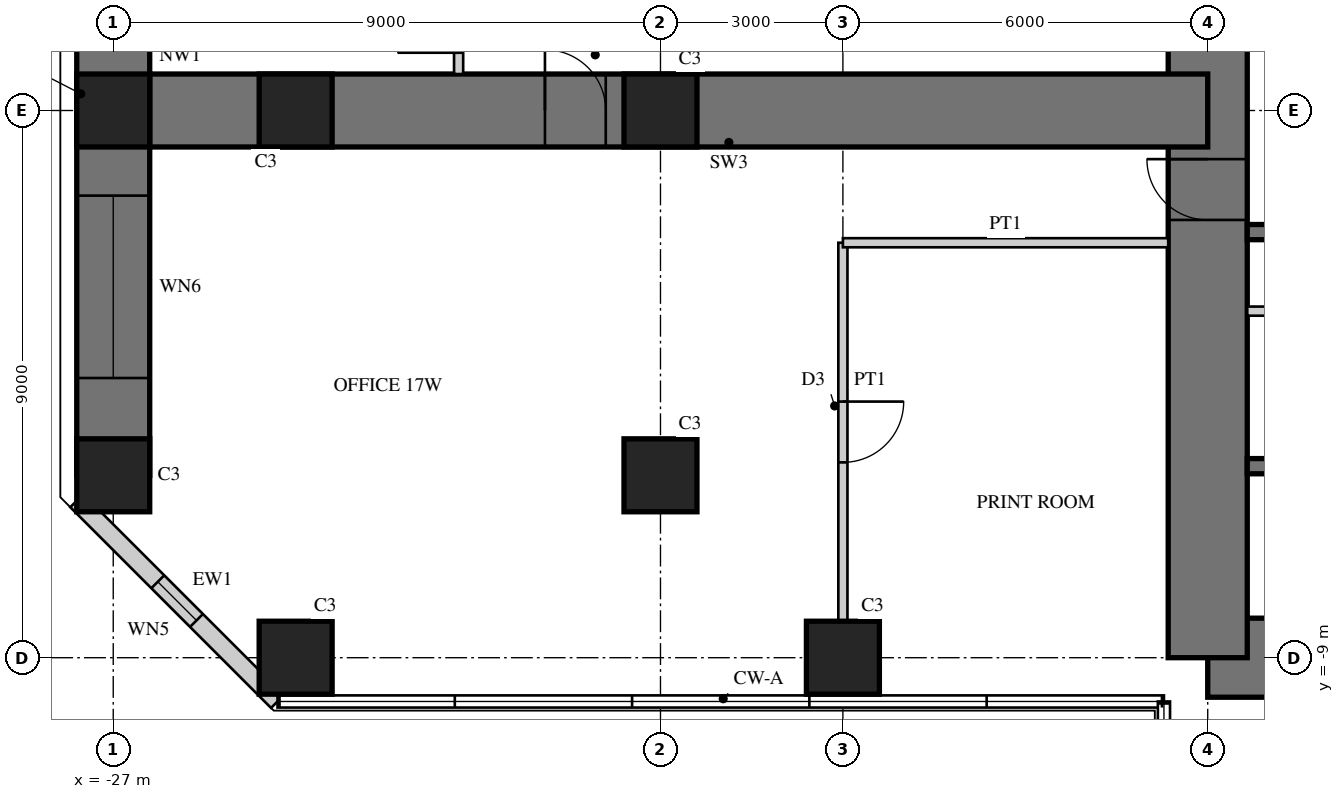
"""IFC4 building model, lengths in metres.
Left out: names, types, materials, properties, quantities, classifications, styles, units other than length and angle.
Written with IfcOpenShell. Run it as: python <this file> out.ifc"""

import sys

from ifc_helpers import new_model, si_unit, direction, frame, frame_2d, origin, origin_2d, place, context, subcontext, project, spatial, rectangle, hollow_rectangle, extrude, element, fill, save


model = new_model("IFC4")
c1 = context("Model", 3, precision=1e-05, world=origin(), true_north=direction((0.0, 1.0)))
c2 = subcontext(c1, "Body", "Model", "MODEL_VIEW")
j1 = project(units=[si_unit("LENGTHUNIT", "METRE"), si_unit("PLANEANGLEUNIT", "RADIAN")], contexts=[c1])
p1 = place(None, origin())
s1 = spatial("IfcSite", under=j1, at=p1, CompositionType="ELEMENT")
p2 = place(p1, origin())
s2 = spatial("IfcBuilding", under=s1, at=p2, CompositionType="ELEMENT")
p3 = place(p2, frame((0.0, 0.0, 71.5)))
s3 = spatial("IfcBuildingStorey", under=s2, at=p3, CompositionType="ELEMENT", Elevation=71.5)
p4 = place(p3, frame((-9.0, -9.0, 0.0), z_axis=(0.0, 0.0, 1.0), x_axis=(1.0, 0.0, 0.0)))
e1 = element("IfcWall", 1, at=p4, inside=s3, PredefinedType="SHEAR", context=c2, shape_type="SweptSolid", body=[
    extrude(rectangle(XDim=18.0, YDim=1.3, at=frame_2d((9.0, 0.0))), origin(), (0.0, 0.0, 1.0), 4.0),
])
p5 = place(p4, frame((9.8, 0.0, 0.0)))
e2 = element("IfcOpeningElement", 2, at=p5, cuts=e1, PredefinedType="OPENING", context=c2, shape_type="SweptSolid", body=[
    extrude(rectangle(XDim=1.0, YDim=2.4, at=frame_2d((0.5, 1.2))), frame((0.0, 0.66, 0.0), z_axis=(0.0, -1.0, 0.0), x_axis=(1.0, 0.0, 0.0)), (0.0, 0.0, 1.0), 1.32),
])
p6 = place(p3, frame((-9.0, 9.0, 0.0), z_axis=(0.0, 0.0, 1.0), x_axis=(0.0, -1.0, 0.0)))
e3 = element("IfcWall", 3, at=p6, inside=s3, PredefinedType="SHEAR", context=c2, shape_type="SweptSolid", body=[
    extrude(rectangle(XDim=18.0, YDim=1.3, at=frame_2d((9.0, 0.0))), origin(), (0.0, 0.0, 1.0), 4.0),
])
p7 = place(p6, frame((9.8, 0.0, 0.0)))
e4 = element("IfcOpeningElement", 4, at=p7, cuts=e3, PredefinedType="OPENING", context=c2, shape_type="SweptSolid", body=[
    extrude(rectangle(XDim=1.0, YDim=2.4, at=frame_2d((0.5, 1.2))), frame((0.0, 0.66, 0.0), z_axis=(0.0, -1.0, 0.0), x_axis=(1.0, 0.0, 0.0)), (0.0, 0.0, 1.0), 1.32),
])
for number, where, z_axis, x_axis in (
    (5, (-1.925, -2.0, 0.0), (0.0, 0.0, 1.0), (-1.0, 0.0, 0.0)),
    (6, (-1.925, -5.85, 0.0), (0.0, 0.0, 1.0), (-1.0, 0.0, 0.0)),
):
    element("IfcWall", number, at=place(p3, frame(where, z_axis=z_axis, x_axis=x_axis)), inside=s3, PredefinedType="SHEAR", context=c2, shape_type="SweptSolid", body=[
        extrude(rectangle(XDim=6.425, YDim=0.25, at=frame_2d((3.212, 0.0))), origin(), (0.0, 0.0, 1.0), 4.0),
    ])
p8 = place(p3, frame((-1.925, -3.3, 0.0), z_axis=(0.0, 0.0, 1.0), x_axis=(-1.0, 0.0, 0.0)))
e7 = element("IfcWall", 7, at=p8, inside=s3, PredefinedType="PARTITIONING", context=c2, shape_type="SweptSolid", body=[
    extrude(rectangle(XDim=6.425, YDim=0.15, at=frame_2d((3.212, 0.0))), origin(), (0.0, 0.0, 1.0), 4.0),
])
p9 = place(p8, frame((0.075, 0.0, 0.0)))
e8 = element("IfcOpeningElement", 8, at=p9, cuts=e7, PredefinedType="OPENING", context=c2, shape_type="SweptSolid", body=[
    extrude(rectangle(XDim=0.8, YDim=2.1, at=frame_2d((0.4, 1.05))), frame((0.0, 0.085, 0.0), z_axis=(0.0, -1.0, 0.0), x_axis=(1.0, 0.0, 0.0)), (0.0, 0.0, 1.0), 0.17),
])
p10 = place(p8, frame((3.675, 0.0, 0.0)))
e9 = element("IfcOpeningElement", 9, at=p10, cuts=e7, PredefinedType="OPENING", context=c2, shape_type="SweptSolid", body=[
    extrude(rectangle(XDim=0.8, YDim=2.1, at=frame_2d((0.4, 1.05))), frame((0.0, 0.085, 0.0), z_axis=(0.0, -1.0, 0.0), x_axis=(1.0, 0.0, 0.0)), (0.0, 0.0, 1.0), 0.17),
])
p11 = place(p3, frame((-9.0, 0.0, 0.0), z_axis=(0.0, 0.0, 1.0), x_axis=(-1.0, 0.0, 0.0)))
e10 = element("IfcWall", 10, at=p11, inside=s3, PredefinedType="SHEAR", context=c2, shape_type="SweptSolid", body=[
    extrude(rectangle(XDim=18.0, YDim=1.2, at=frame_2d((9.0, 0.0))), origin(), (0.0, 0.0, 1.0), 4.0),
])
p12 = place(p11, frame((9.9, 0.0, 0.0)))
e11 = element("IfcOpeningElement", 11, at=p12, cuts=e10, PredefinedType="OPENING", context=c2, shape_type="SweptSolid", body=[
    extrude(rectangle(XDim=1.0, YDim=2.2, at=frame_2d((0.5, 1.1))), frame((0.0, 0.61, 0.0), z_axis=(0.0, -1.0, 0.0), x_axis=(1.0, 0.0, 0.0)), (0.0, 0.0, 1.0), 1.22),
])
p13 = place(p3, frame((-27.0, 6.0, 0.0), z_axis=(0.0, 0.0, 1.0), x_axis=(0.0, -1.0, 0.0)))
e12 = element("IfcWall", 12, at=p13, inside=s3, PredefinedType="SHEAR", context=c2, shape_type="SweptSolid", body=[
    extrude(rectangle(XDim=12.0, YDim=1.2, at=frame_2d((6.0, 0.0))), origin(), (0.0, 0.0, 1.0), 4.0),
])
p14 = place(p13, frame((1.6, 0.0, 0.6)))
e13 = element("IfcOpeningElement", 13, at=p14, cuts=e12, PredefinedType="OPENING", context=c2, shape_type="SweptSolid", body=[
    extrude(rectangle(XDim=3.0, YDim=2.4, at=frame_2d((1.5, 1.2))), frame((0.0, 0.61, 0.0), z_axis=(0.0, -1.0, 0.0), x_axis=(1.0, 0.0, 0.0)), (0.0, 0.0, 1.0), 1.22),
])
p15 = place(p13, frame((7.4, 0.0, 0.6)))
e14 = element("IfcOpeningElement", 14, at=p15, cuts=e12, PredefinedType="OPENING", context=c2, shape_type="SweptSolid", body=[
    extrude(rectangle(XDim=3.0, YDim=2.4, at=frame_2d((1.5, 1.2))), frame((0.0, 0.61, 0.0), z_axis=(0.0, -1.0, 0.0), x_axis=(1.0, 0.0, 0.0)), (0.0, 0.0, 1.0), 1.22),
])
for number, where, z_axis, x_axis in (
    (15, (-15.0, -9.0, 0.0), (0.0, 0.0, 1.0), (1.0, 0.0, 0.0)),
    (16, (-24.0, -9.0, 0.0), (0.0, 0.0, 1.0), (1.0, 0.0, 0.0)),
    (17, (-27.0, 0.0, 0.0), (0.0, 0.0, 1.0), (1.0, 0.0, 0.0)),
    (18, (-27.0, -6.0, 0.0), (0.0, 0.0, 1.0), (1.0, 0.0, 0.0)),
    (19, (-18.0, 0.0, 0.0), (0.0, 0.0, 1.0), (1.0, 0.0, 0.0)),
    (20, (-18.0, -6.0, 0.0), (0.0, 0.0, 1.0), (1.0, 0.0, 0.0)),
    (21, (-24.0, 0.0, 0.0), (0.0, 0.0, 1.0), (1.0, 0.0, 0.0)),
):
    element("IfcColumn", number, at=place(p3, frame(where, z_axis=z_axis, x_axis=x_axis)), inside=s3, PredefinedType="COLUMN", context=c2, shape_type="SweptSolid", body=[
        extrude(rectangle(XDim=1.2, YDim=1.2, at=origin_2d()), origin(), (0.0, 0.0, 1.0), 4.0),
    ])
p16 = place(p3, frame((-27.6, -6.418, 0.0), z_axis=(0.0, 0.0, 1.0), x_axis=(0.707106781187, -0.707106781187, 0.0)))
e22 = element("IfcWall", 22, at=p16, inside=s3, PredefinedType="SOLIDWALL", context=c2, shape_type="SweptSolid", body=[
    extrude(rectangle(XDim=4.669, YDim=0.3, at=frame_2d((2.335, 0.0))), origin(), (0.0, 0.0, 1.0), 3.8),
])
p17 = place(p16, frame((1.885, 0.0, 0.3)))
e23 = element("IfcOpeningElement", 23, at=p17, cuts=e22, PredefinedType="OPENING", context=c2, shape_type="SweptSolid", body=[
    extrude(rectangle(XDim=0.9, YDim=2.4, at=frame_2d((0.45, 1.2))), frame((0.0, 0.16, 0.0), z_axis=(0.0, -1.0, 0.0), x_axis=(1.0, 0.0, 0.0)), (0.0, 0.0, 1.0), 0.32),
])
p18 = place(p3, frame((-15.0, -2.175, 0.0), z_axis=(0.0, 0.0, 1.0), x_axis=(0.0, -1.0, 0.0)))
e24 = element("IfcWall", 24, at=p18, inside=s3, PredefinedType="PARTITIONING", context=c2, shape_type="SweptSolid", body=[
    extrude(rectangle(XDim=6.225, YDim=0.15, at=frame_2d((3.112, 0.0))), origin(), (0.0, 0.0, 1.0), 2.95),
])
p19 = place(p18, frame((2.613, 0.0, 0.0)))
e25 = element("IfcOpeningElement", 25, at=p19, cuts=e24, PredefinedType="OPENING", context=c2, shape_type="SweptSolid", body=[
    extrude(rectangle(XDim=1.0, YDim=2.1, at=frame_2d((0.5, 1.05))), frame((0.0, 0.085, 0.0), z_axis=(0.0, -1.0, 0.0), x_axis=(1.0, 0.0, 0.0)), (0.0, 0.0, 1.0), 0.17),
])
p20 = place(p3, frame((-9.65, -2.175, 0.0), z_axis=(0.0, 0.0, 1.0), x_axis=(-1.0, 0.0, 0.0)))
e26 = element("IfcWall", 26, at=p20, inside=s3, PredefinedType="PARTITIONING", context=c2, shape_type="SweptSolid", body=[
    extrude(rectangle(XDim=5.35, YDim=0.15, at=frame_2d((2.675, 0.0))), origin(), (0.0, 0.0, 1.0), 3.8),
])
p21 = place(p3, frame((-21.32, 9.68, 0.0), z_axis=(0.0, 0.0, 1.0), x_axis=(0.0, -1.0, 0.0)))
e27 = element("IfcWall", 27, at=p21, inside=s3, PredefinedType="PARTITIONING", context=c2, shape_type="SweptSolid", body=[
    extrude(rectangle(XDim=9.08, YDim=0.15, at=frame_2d((4.54, 0.0))), origin(), (0.0, 0.0, 1.0), 3.8),
])
p22 = place(p21, frame((5.087, 0.0, 0.0)))
e28 = element("IfcOpeningElement", 28, at=p22, cuts=e27, PredefinedType="OPENING", context=c2, shape_type="SweptSolid", body=[
    extrude(rectangle(XDim=1.0, YDim=2.2, at=frame_2d((0.5, 1.1))), frame((0.0, 0.085, 0.0), z_axis=(0.0, -1.0, 0.0), x_axis=(1.0, 0.0, 0.0)), (0.0, 0.0, 1.0), 0.17),
])
p23 = place(p21, frame((7.73, 0.0, 0.0)))
e29 = element("IfcOpeningElement", 29, at=p23, cuts=e27, PredefinedType="OPENING", context=c2, shape_type="SweptSolid", body=[
    extrude(rectangle(XDim=1.0, YDim=2.2, at=frame_2d((0.5, 1.1))), frame((0.0, 0.085, 0.0), z_axis=(0.0, -1.0, 0.0), x_axis=(1.0, 0.0, 0.0)), (0.0, 0.0, 1.0), 0.17),
])
p24 = place(p15, origin())
e30 = element("IfcWindow", 30, at=p24, inside=s3, PartitioningType="SINGLE_PANEL", PredefinedType="WINDOW", context=c2, shape_type="SweptSolid", body=[
    extrude(hollow_rectangle(XDim=3.0, YDim=2.4, WallThickness=0.06, at=frame_2d((1.5, 1.2))), frame((0.0, 0.03, 0.0), z_axis=(0.0, -1.0, 0.0), x_axis=(1.0, 0.0, 0.0)), (0.0, 0.0, 1.0), 0.06),
    extrude(rectangle(XDim=2.879, YDim=2.279, at=frame_2d((1.5, 1.2))), frame((0.0, 0.03, 0.0), z_axis=(0.0, -1.0, 0.0), x_axis=(1.0, 0.0, 0.0)), (0.0, 0.0, 1.0), 0.06),
])
fill(e14, e30)
p25 = place(p17, origin())
e31 = element("IfcWindow", 31, at=p25, inside=s3, PartitioningType="SINGLE_PANEL", PredefinedType="WINDOW", context=c2, shape_type="SweptSolid", body=[
    extrude(hollow_rectangle(XDim=0.9, YDim=2.4, WallThickness=0.06, at=frame_2d((0.45, 1.2))), frame((0.0, 0.03, 0.0), z_axis=(0.0, -1.0, 0.0), x_axis=(1.0, 0.0, 0.0)), (0.0, 0.0, 1.0), 0.06),
    extrude(rectangle(XDim=0.779, YDim=2.279, at=frame_2d((0.45, 1.2))), frame((0.0, 0.03, 0.0), z_axis=(0.0, -1.0, 0.0), x_axis=(1.0, 0.0, 0.0)), (0.0, 0.0, 1.0), 0.06),
])
fill(e23, e31)
p26 = place(p19, origin())
e32 = element("IfcDoor", 32, at=p26, inside=s3, OperationType="SINGLE_SWING_LEFT", PredefinedType="DOOR", context=c2, shape_type="SweptSolid", body=[
    extrude(rectangle(XDim=1.0, YDim=2.1, at=frame_2d((0.5, 1.05))), frame((0.0, 0.025, 0.0), z_axis=(0.0, -1.0, 0.0), x_axis=(1.0, 0.0, 0.0)), (0.0, 0.0, 1.0), 0.05),
])
fill(e25, e32)
p27 = place(p23, frame((1.0, 0.0, 0.0), z_axis=(0.0, 0.0, 1.0), x_axis=(-1.0, 0.0, 0.0)))
e33 = element("IfcDoor", 33, at=p27, inside=s3, OperationType="SINGLE_SWING_LEFT", PredefinedType="DOOR", context=c2, shape_type="SweptSolid", body=[
    extrude(rectangle(XDim=1.0, YDim=2.2, at=frame_2d((0.5, 1.1))), frame((0.0, 0.025, 0.0), z_axis=(0.0, -1.0, 0.0), x_axis=(1.0, 0.0, 0.0)), (0.0, 0.0, 1.0), 0.05),
])
fill(e29, e33)
p28 = place(p12, frame((1.0, 0.0, 0.0), z_axis=(0.0, 0.0, 1.0), x_axis=(-1.0, 0.0, 0.0)))
e34 = element("IfcDoor", 34, at=p28, inside=s3, OperationType="SINGLE_SWING_LEFT", PredefinedType="DOOR", context=c2, shape_type="SweptSolid", body=[
    extrude(rectangle(XDim=1.0, YDim=2.2, at=frame_2d((0.5, 1.1))), frame((0.0, 0.025, 0.0), z_axis=(0.0, -1.0, 0.0), x_axis=(1.0, 0.0, 0.0)), (0.0, 0.0, 1.0), 0.05),
])
fill(e11, e34)
p29 = place(p7, frame((1.0, 0.0, 0.0), z_axis=(0.0, 0.0, 1.0), x_axis=(-1.0, 0.0, 0.0)))
e35 = element("IfcDoor", 35, at=p29, inside=s3, OperationType="SINGLE_SWING_RIGHT", PredefinedType="DOOR", context=c2, shape_type="SweptSolid", body=[
    extrude(rectangle(XDim=1.0, YDim=2.4, at=frame_2d((0.5, 1.2))), frame((0.0, -0.005, 0.0), z_axis=(0.0, -1.0, 0.0), x_axis=(1.0, 0.0, 0.0)), (0.0, 0.0, 1.0), 0.05),
])
fill(e4, e35)
save(model, sys.argv[1])
